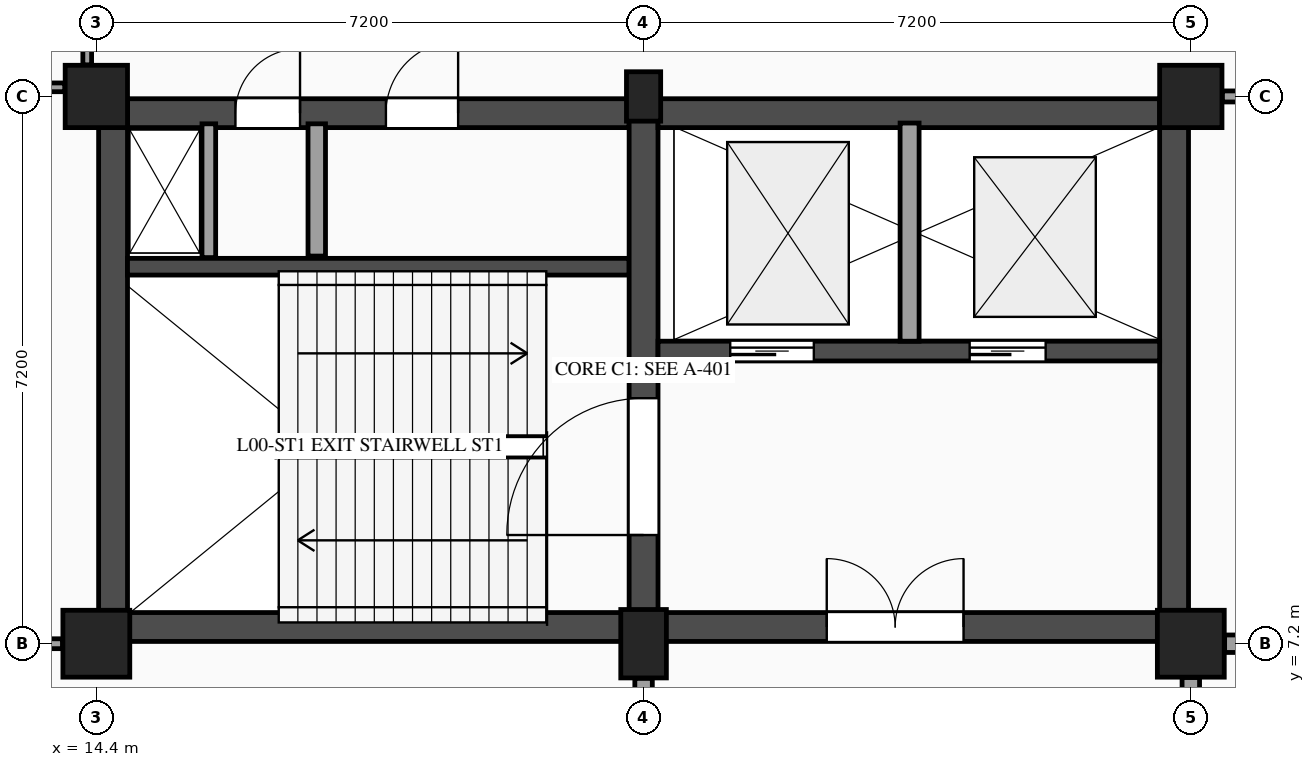
"""IFC4 building model, lengths in metres.
Left out: names, types, materials, properties, quantities, classifications, styles, units other than length and angle.
Written with IfcOpenShell. Run it as: python <this file> out.ifc"""

import sys

from ifc_helpers import new_model, si_unit, direction, frame, frame_2d, origin, origin_2d, place, context, subcontext, project, spatial, rectangle, extrude, element, fill, save


model = new_model("IFC4")
c1 = context("Model", 3, precision=1e-05, world=origin(), true_north=direction((0.0, 1.0)))
c2 = subcontext(c1, "Body", "Model", "MODEL_VIEW")
j1 = project(units=[si_unit("LENGTHUNIT", "METRE"), si_unit("PLANEANGLEUNIT", "RADIAN")], contexts=[c1])
p1 = place(None, origin())
s1 = spatial("IfcSite", under=j1, at=p1, CompositionType="ELEMENT")
p2 = place(p1, origin())
s2 = spatial("IfcBuilding", under=s1, at=p2, CompositionType="ELEMENT")
p3 = place(p2, origin())
s3 = spatial("IfcBuildingStorey", under=s2, at=p3, CompositionType="ELEMENT", Elevation=0.0)
p4 = place(p3, frame((14.4, 7.2, 0.0), z_axis=(0.0, 0.0, 1.0), x_axis=(1.0, 0.0, 0.0)))
e1 = element("IfcColumn", 1, at=p4, inside=s3, PredefinedType="COLUMN", context=c2, shape_type="SweptSolid", body=[
    extrude(rectangle(XDim=0.88, YDim=0.88, at=origin_2d()), origin(), (0.0, 0.0, 1.0), 5.4),
])
p5 = place(p3, frame((14.4, 14.4, 0.0), z_axis=(0.0, 0.0, 1.0), x_axis=(1.0, 0.0, 0.0)))
e2 = element("IfcColumn", 2, at=p5, inside=s3, PredefinedType="COLUMN", context=c2, shape_type="SweptSolid", body=[
    extrude(rectangle(XDim=0.82, YDim=0.82, at=origin_2d()), origin(), (0.0, 0.0, 1.0), 5.4),
])
p6 = place(p3, frame((21.6, 7.2, 0.0), z_axis=(0.0, 0.0, 1.0), x_axis=(1.0, 0.0, 0.0)))
e3 = element("IfcColumn", 3, at=p6, inside=s3, PredefinedType="COLUMN", context=c2, shape_type="SweptSolid", body=[
    extrude(rectangle(XDim=0.6, YDim=0.9, at=origin_2d()), origin(), (0.0, 0.0, 1.0), 5.4),
])
p7 = place(p3, frame((21.6, 14.4, 0.0), z_axis=(0.0, 0.0, 1.0), x_axis=(1.0, 0.0, 0.0)))
e4 = element("IfcColumn", 4, at=p7, inside=s3, PredefinedType="PILASTER", context=c2, shape_type="SweptSolid", body=[
    extrude(rectangle(XDim=0.45, YDim=0.65, at=origin_2d()), origin(), (0.0, 0.0, 1.0), 5.4),
])
p8 = place(p3, frame((28.8, 7.2, 0.0), z_axis=(0.0, 0.0, 1.0), x_axis=(1.0, 0.0, 0.0)))
e5 = element("IfcColumn", 5, at=p8, inside=s3, PredefinedType="COLUMN", context=c2, shape_type="SweptSolid", body=[
    extrude(rectangle(XDim=0.88, YDim=0.88, at=origin_2d()), origin(), (0.0, 0.0, 1.0), 5.4),
])
p9 = place(p3, frame((28.8, 14.4, 0.0), z_axis=(0.0, 0.0, 1.0), x_axis=(1.0, 0.0, 0.0)))
e6 = element("IfcColumn", 6, at=p9, inside=s3, PredefinedType="COLUMN", context=c2, shape_type="SweptSolid", body=[
    extrude(rectangle(XDim=0.82, YDim=0.82, at=origin_2d()), origin(), (0.0, 0.0, 1.0), 5.4),
])
p10 = place(p3, frame((14.81, 7.42, 0.0), z_axis=(0.0, 0.0, 1.0), x_axis=(1.0, 0.0, 0.0)))
e7 = element("IfcWall", 7, at=p10, inside=s3, PredefinedType="SHEAR", context=c2, shape_type="SweptSolid", body=[
    extrude(rectangle(XDim=6.6, YDim=0.38, at=frame_2d((3.3, 0.0))), origin(), (0.0, 0.0, 1.0), 5.09),
])
p11 = place(p3, frame((14.62, 14.37, 0.0), z_axis=(0.0, 0.0, 1.0), x_axis=(0.0, -1.0, 0.0)))
e8 = element("IfcWall", 8, at=p11, inside=s3, PredefinedType="SHEAR", context=c2, shape_type="SweptSolid", body=[
    extrude(rectangle(XDim=7.14, YDim=0.38, at=frame_2d((3.57, 0.0))), origin(), (0.0, 0.0, 1.0), 5.09),
])
p12 = place(p3, frame((14.81, 14.18, 0.0), z_axis=(0.0, 0.0, 1.0), x_axis=(1.0, 0.0, 0.0)))
e9 = element("IfcWall", 9, at=p12, inside=s3, PredefinedType="SHEAR", context=c2, shape_type="SweptSolid", body=[
    extrude(rectangle(XDim=6.6, YDim=0.38, at=frame_2d((3.3, 0.0))), origin(), (0.0, 0.0, 1.0), 5.09),
])
p13 = place(p12, frame((1.42, 0.0, 0.0)))
e10 = element("IfcOpeningElement", 10, at=p13, cuts=e9, PredefinedType="OPENING", context=c2, shape_type="SweptSolid", body=[
    extrude(rectangle(XDim=0.85, YDim=2.1, at=frame_2d((0.425, 1.05))), frame((0.0, 0.2, 0.0), z_axis=(0.0, -1.0, 0.0), x_axis=(1.0, 0.0, 0.0)), (0.0, 0.0, 1.0), 0.4),
])
p14 = place(p12, frame((3.4, 0.0, 0.0)))
e11 = element("IfcOpeningElement", 11, at=p14, cuts=e9, PredefinedType="OPENING", context=c2, shape_type="SweptSolid", body=[
    extrude(rectangle(XDim=0.95, YDim=2.15, at=frame_2d((0.475, 1.075))), frame((0.0, 0.2, 0.0), z_axis=(0.0, -1.0, 0.0), x_axis=(1.0, 0.0, 0.0)), (0.0, 0.0, 1.0), 0.4),
])
p15 = place(p3, frame((14.81, 12.16, 0.0), z_axis=(0.0, 0.0, 1.0), x_axis=(1.0, 0.0, 0.0)))
e12 = element("IfcWall", 12, at=p15, inside=s3, PredefinedType="SHEAR", context=c2, shape_type="SweptSolid", body=[
    extrude(rectangle(XDim=6.6, YDim=0.22, at=frame_2d((3.3, 0.0))), origin(), (0.0, 0.0, 1.0), 5.09),
])
p16 = place(p3, frame((17.3, 12.3, 0.0), z_axis=(0.0, 0.0, 1.0), x_axis=(0.0, 1.0, 0.0)))
e13 = element("IfcWall", 13, at=p16, inside=s3, PredefinedType="PARTITIONING", context=c2, shape_type="SweptSolid", body=[
    extrude(rectangle(XDim=1.74, YDim=0.23, at=frame_2d((0.87, 0.0))), origin(), (0.0, 0.0, 1.0), 5.09),
])
p17 = place(p3, frame((15.88, 12.28, 0.0), z_axis=(0.0, 0.0, 1.0), x_axis=(0.0, 1.0, 0.0)))
e14 = element("IfcWall", 14, at=p17, inside=s3, PredefinedType="PARTITIONING", context=c2, shape_type="SweptSolid", body=[
    extrude(rectangle(XDim=1.76, YDim=0.18, at=frame_2d((0.88, 0.0))), origin(), (0.0, 0.0, 1.0), 5.09),
])
p18 = place(p3, frame((21.6, 7.23, 0.0), z_axis=(0.0, 0.0, 1.0), x_axis=(0.0, 1.0, 0.0)))
e15 = element("IfcWall", 15, at=p18, inside=s3, PredefinedType="SHEAR", context=c2, shape_type="SweptSolid", body=[
    extrude(rectangle(XDim=7.14, YDim=0.38, at=frame_2d((3.57, 0.0))), origin(), (0.0, 0.0, 1.0), 5.09),
])
p19 = place(p18, frame((1.4, 0.0, 0.0)))
e16 = element("IfcOpeningElement", 16, at=p19, cuts=e15, PredefinedType="OPENING", context=c2, shape_type="SweptSolid", body=[
    extrude(rectangle(XDim=1.8, YDim=2.2, at=frame_2d((0.9, 1.1))), frame((0.0, 0.2, 0.0), z_axis=(0.0, -1.0, 0.0), x_axis=(1.0, 0.0, 0.0)), (0.0, 0.0, 1.0), 0.4),
])
p20 = place(p3, frame((21.79, 7.42, 0.0), z_axis=(0.0, 0.0, 1.0), x_axis=(1.0, 0.0, 0.0)))
e17 = element("IfcWall", 17, at=p20, inside=s3, PredefinedType="SHEAR", context=c2, shape_type="SweptSolid", body=[
    extrude(rectangle(XDim=6.6, YDim=0.38, at=frame_2d((3.3, 0.0))), origin(), (0.0, 0.0, 1.0), 5.09),
])
p21 = place(p20, frame((2.22, 0.0, 0.0)))
e18 = element("IfcOpeningElement", 18, at=p21, cuts=e17, PredefinedType="OPENING", context=c2, shape_type="SweptSolid", body=[
    extrude(rectangle(XDim=1.8, YDim=2.2, at=frame_2d((0.9, 1.1))), frame((0.0, 0.2, 0.0), z_axis=(0.0, -1.0, 0.0), x_axis=(1.0, 0.0, 0.0)), (0.0, 0.0, 1.0), 0.4),
])
p22 = place(p3, frame((28.58, 7.23, 0.0), z_axis=(0.0, 0.0, 1.0), x_axis=(0.0, 1.0, 0.0)))
e19 = element("IfcWall", 19, at=p22, inside=s3, PredefinedType="SHEAR", context=c2, shape_type="SweptSolid", body=[
    extrude(rectangle(XDim=7.14, YDim=0.38, at=frame_2d((3.57, 0.0))), origin(), (0.0, 0.0, 1.0), 5.09),
])
p23 = place(p3, frame((21.79, 14.18, 0.0), z_axis=(0.0, 0.0, 1.0), x_axis=(1.0, 0.0, 0.0)))
e20 = element("IfcWall", 20, at=p23, inside=s3, PredefinedType="SHEAR", context=c2, shape_type="SweptSolid", body=[
    extrude(rectangle(XDim=6.6, YDim=0.38, at=frame_2d((3.3, 0.0))), origin(), (0.0, 0.0, 1.0), 5.09),
])
p24 = place(p3, frame((21.79, 11.05, 0.0), z_axis=(0.0, 0.0, 1.0), x_axis=(1.0, 0.0, 0.0)))
e21 = element("IfcWall", 21, at=p24, inside=s3, PredefinedType="SHEAR", context=c2, shape_type="SweptSolid", body=[
    extrude(rectangle(XDim=6.6, YDim=0.26, at=frame_2d((3.3, 0.0))), origin(), (0.0, 0.0, 1.0), 5.09),
])
p25 = place(p24, frame((0.95, 0.0, 0.0)))
e22 = element("IfcOpeningElement", 22, at=p25, cuts=e21, PredefinedType="OPENING", context=c2, shape_type="SweptSolid", body=[
    extrude(rectangle(XDim=1.1, YDim=2.2, at=frame_2d((0.55, 1.1))), frame((0.0, 0.14, 0.0), z_axis=(0.0, -1.0, 0.0), x_axis=(1.0, 0.0, 0.0)), (0.0, 0.0, 1.0), 0.28),
])
p26 = place(p24, frame((4.1, 0.0, 0.0)))
e23 = element("IfcOpeningElement", 23, at=p26, cuts=e21, PredefinedType="OPENING", context=c2, shape_type="SweptSolid", body=[
    extrude(rectangle(XDim=1.0, YDim=2.15, at=frame_2d((0.5, 1.075))), frame((0.0, 0.14, 0.0), z_axis=(0.0, -1.0, 0.0), x_axis=(1.0, 0.0, 0.0)), (0.0, 0.0, 1.0), 0.28),
])
p27 = place(p3, frame((25.1, 11.18, 0.0), z_axis=(0.0, 0.0, 1.0), x_axis=(0.0, 1.0, 0.0)))
e24 = element("IfcWall", 24, at=p27, inside=s3, PredefinedType="PARTITIONING", context=c2, shape_type="SweptSolid", body=[
    extrude(rectangle(XDim=2.87, YDim=0.25, at=frame_2d((1.435, 0.0))), origin(), (0.0, 0.0, 1.0), 5.09),
])
p28 = place(p3, frame((7.43, 14.52, 0.0), z_axis=(0.0, 0.0, 1.0), x_axis=(1.0, 0.0, 0.0)))
e25 = element("IfcWall", 25, at=p28, inside=s3, PredefinedType="PARTITIONING", context=c2, shape_type="SweptSolid", body=[
    extrude(rectangle(XDim=6.555, YDim=0.115, at=frame_2d((3.278, 0.0))), origin(), (0.0, 0.0, 1.0), 4.34),
])
p29 = place(p3, frame((14.28, 14.815, 0.0), z_axis=(0.0, 0.0, 1.0), x_axis=(0.0, 1.0, 0.0)))
e26 = element("IfcWall", 26, at=p29, inside=s3, PredefinedType="PARTITIONING", context=c2, shape_type="SweptSolid", body=[
    extrude(rectangle(XDim=6.38, YDim=0.115, at=frame_2d((3.19, 0.0))), origin(), (0.0, 0.0, 1.0), 4.405),
])
p30 = place(p29, frame((0.585, 0.0, 0.0)))
e27 = element("IfcOpeningElement", 27, at=p30, cuts=e26, PredefinedType="OPENING", context=c2, shape_type="SweptSolid", body=[
    extrude(rectangle(XDim=0.95, YDim=2.1, at=frame_2d((0.475, 1.05))), frame((0.0, 0.067, 0.0), z_axis=(0.0, -1.0, 0.0), x_axis=(1.0, 0.0, 0.0)), (0.0, 0.0, 1.0), 0.135),
])
p31 = place(p29, frame((2.685, 0.0, 0.0)))
e28 = element("IfcOpeningElement", 28, at=p31, cuts=e26, PredefinedType="OPENING", context=c2, shape_type="SweptSolid", body=[
    extrude(rectangle(XDim=0.95, YDim=2.1, at=frame_2d((0.475, 1.05))), frame((0.0, 0.067, 0.0), z_axis=(0.0, -1.0, 0.0), x_axis=(1.0, 0.0, 0.0)), (0.0, 0.0, 1.0), 0.135),
])
p32 = place(p29, frame((4.835, 0.0, 0.0)))
e29 = element("IfcOpeningElement", 29, at=p32, cuts=e26, PredefinedType="OPENING", context=c2, shape_type="SweptSolid", body=[
    extrude(rectangle(XDim=1.0, YDim=2.15, at=frame_2d((0.5, 1.075))), frame((0.0, 0.067, 0.0), z_axis=(0.0, -1.0, 0.0), x_axis=(1.0, 0.0, 0.0)), (0.0, 0.0, 1.0), 0.135),
])
p33 = place(p3, frame((7.505, 7.2, 0.0), z_axis=(0.0, 0.0, 1.0), x_axis=(1.0, 0.0, 0.0)))
e30 = element("IfcWall", 30, at=p33, inside=s3, PredefinedType="PARTITIONING", context=c2, shape_type="SweptSolid", body=[
    extrude(rectangle(XDim=6.45, YDim=0.13, at=frame_2d((3.225, 0.0))), origin(), (0.0, 0.0, 1.0), 4.34),
])
p34 = place(p33, frame((2.445, 0.0, 0.0)))
e31 = element("IfcOpeningElement", 31, at=p34, cuts=e30, PredefinedType="OPENING", context=c2, shape_type="SweptSolid", body=[
    extrude(rectangle(XDim=1.56, YDim=2.25, at=frame_2d((0.78, 1.125))), frame((0.0, 0.075, 0.0), z_axis=(0.0, -1.0, 0.0), x_axis=(1.0, 0.0, 0.0)), (0.0, 0.0, 1.0), 0.15),
])
p35 = place(p3, frame((21.6, 0.405, 0.0), z_axis=(0.0, 0.0, 1.0), x_axis=(0.0, 1.0, 0.0)))
e32 = element("IfcWall", 32, at=p35, inside=s3, PredefinedType="PARTITIONING", context=c2, shape_type="SweptSolid", body=[
    extrude(rectangle(XDim=6.34, YDim=0.23, at=frame_2d((3.17, 0.0))), origin(), (0.0, 0.0, 1.0), 4.455),
])
p36 = place(p3, frame((28.8, 0.455, 0.0), z_axis=(0.0, 0.0, 1.0), x_axis=(0.0, 1.0, 0.0)))
e33 = element("IfcWall", 33, at=p36, inside=s3, PredefinedType="PARTITIONING", context=c2, shape_type="SweptSolid", body=[
    extrude(rectangle(XDim=6.3, YDim=0.23, at=frame_2d((3.15, 0.0))), origin(), (0.0, 0.0, 1.0), 4.455),
])
p37 = place(p36, frame((2.475, 0.0, 0.0)))
e34 = element("IfcOpeningElement", 34, at=p37, cuts=e33, PredefinedType="OPENING", context=c2, shape_type="SweptSolid", body=[
    extrude(rectangle(XDim=1.35, YDim=2.15, at=frame_2d((0.675, 1.075))), frame((0.0, 0.125, 0.0), z_axis=(0.0, -1.0, 0.0), x_axis=(1.0, 0.0, 0.0)), (0.0, 0.0, 1.0), 0.25),
])
p38 = place(p3, frame((29.245, 7.2, 0.0), z_axis=(0.0, 0.0, 1.0), x_axis=(1.0, 0.0, 0.0)))
e35 = element("IfcWall", 35, at=p38, inside=s3, PredefinedType="PARTITIONING", context=c2, shape_type="SweptSolid", body=[
    extrude(rectangle(XDim=6.45, YDim=0.23, at=frame_2d((3.225, 0.0))), origin(), (0.0, 0.0, 1.0), 4.37),
])
p39 = place(p3, frame((29.215, 14.4, 0.0), z_axis=(0.0, 0.0, 1.0), x_axis=(1.0, 0.0, 0.0)))
e36 = element("IfcWall", 36, at=p39, inside=s3, PredefinedType="PARTITIONING", context=c2, shape_type="SweptSolid", body=[
    extrude(rectangle(XDim=6.555, YDim=0.145, at=frame_2d((3.277, 0.0))), origin(), (0.0, 0.0, 1.0), 4.37),
])
p40 = place(p13, origin())
e37 = element("IfcDoor", 37, at=p40, inside=s3, OperationType="SINGLE_SWING_RIGHT", PredefinedType="DOOR", context=c2, shape_type="SweptSolid", body=[
    extrude(rectangle(XDim=0.85, YDim=2.1, at=frame_2d((0.425, 1.05))), frame((0.0, 0.025, 0.0), z_axis=(0.0, -1.0, 0.0), x_axis=(1.0, 0.0, 0.0)), (0.0, 0.0, 1.0), 0.05),
])
fill(e10, e37)
p41 = place(p19, frame((1.8, 0.0, 0.0), z_axis=(0.0, 0.0, 1.0), x_axis=(-1.0, 0.0, 0.0)))
e38 = element("IfcDoor", 38, at=p41, inside=s3, OperationType="SINGLE_SWING_LEFT", PredefinedType="DOOR", context=c2, shape_type="SweptSolid", body=[
    extrude(rectangle(XDim=1.8, YDim=2.2, at=frame_2d((0.9, 1.1))), frame((0.0, 0.025, 0.0), z_axis=(0.0, -1.0, 0.0), x_axis=(1.0, 0.0, 0.0)), (0.0, 0.0, 1.0), 0.05),
])
fill(e16, e38)
p42 = place(p14, origin())
e39 = element("IfcDoor", 39, at=p42, inside=s3, OperationType="SINGLE_SWING_RIGHT", PredefinedType="DOOR", context=c2, shape_type="SweptSolid", body=[
    extrude(rectangle(XDim=0.95, YDim=2.15, at=frame_2d((0.475, 1.075))), frame((0.0, 0.025, 0.0), z_axis=(0.0, -1.0, 0.0), x_axis=(1.0, 0.0, 0.0)), (0.0, 0.0, 1.0), 0.05),
])
fill(e11, e39)
p43 = place(p25, origin())
e40 = element("IfcDoor", 40, at=p43, inside=s3, OperationType="SLIDING_TO_LEFT", PredefinedType="DOOR", context=c2, shape_type="SweptSolid", body=[
    extrude(rectangle(XDim=1.1, YDim=2.2, at=frame_2d((0.55, 1.1))), frame((0.0, 0.025, 0.0), z_axis=(0.0, -1.0, 0.0), x_axis=(1.0, 0.0, 0.0)), (0.0, 0.0, 1.0), 0.05),
])
fill(e22, e40)
p44 = place(p26, origin())
e41 = element("IfcDoor", 41, at=p44, inside=s3, OperationType="SLIDING_TO_RIGHT", PredefinedType="DOOR", context=c2, shape_type="SweptSolid", body=[
    extrude(rectangle(XDim=1.0, YDim=2.15, at=frame_2d((0.5, 1.075))), frame((0.0, 0.025, 0.0), z_axis=(0.0, -1.0, 0.0), x_axis=(1.0, 0.0, 0.0)), (0.0, 0.0, 1.0), 0.05),
])
fill(e23, e41)
p45 = place(p21, frame((1.8, 0.0, 0.0), z_axis=(0.0, 0.0, 1.0), x_axis=(-1.0, 0.0, 0.0)))
e42 = element("IfcDoor", 42, at=p45, inside=s3, OperationType="DOUBLE_DOOR_SINGLE_SWING", PredefinedType="DOOR", context=c2, shape_type="SweptSolid", body=[
    extrude(rectangle(XDim=1.8, YDim=2.2, at=frame_2d((0.9, 1.1))), frame((0.0, 0.025, 0.0), z_axis=(0.0, -1.0, 0.0), x_axis=(1.0, 0.0, 0.0)), (0.0, 0.0, 1.0), 0.05),
])
fill(e18, e42)
save(model, sys.argv[1])
